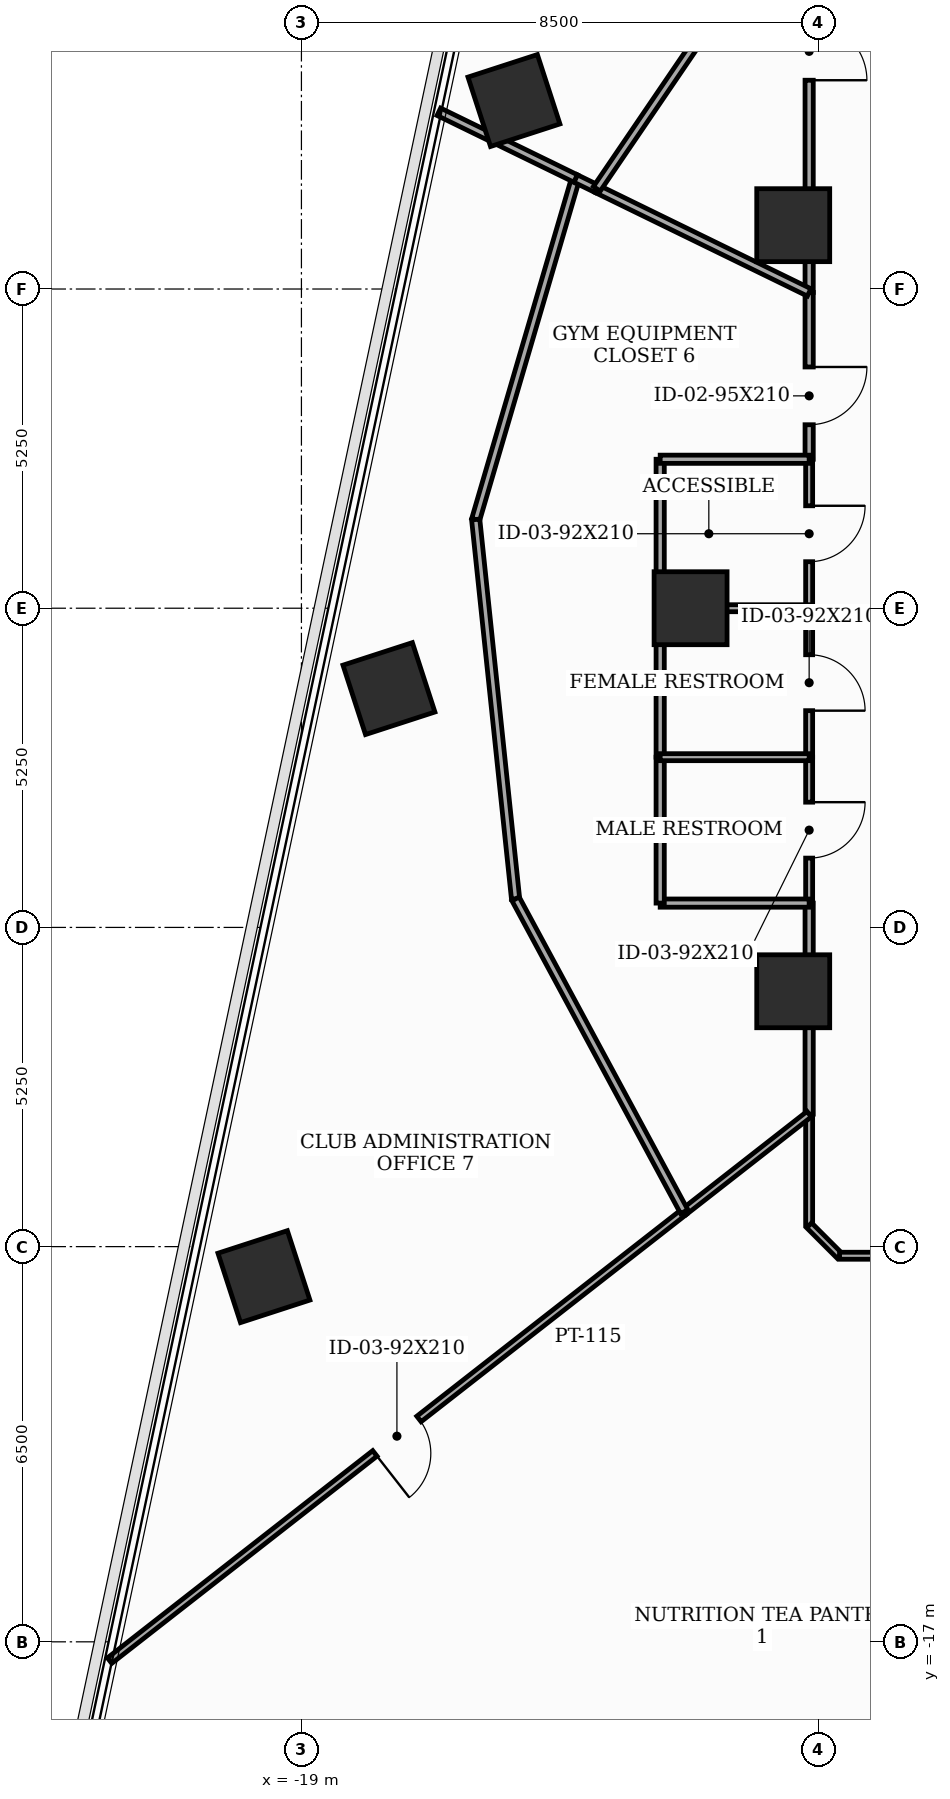
"""IFC4 building model, lengths in metres.
Left out: names, types, materials, properties, quantities, classifications, styles, units other than length and angle.
Written with IfcOpenShell. Run it as: python <this file> out.ifc"""

import sys

from ifc_helpers import new_model, si_unit, direction, frame, frame_2d, origin, origin_2d, place, context, subcontext, project, spatial, rectangle, extrude, element, fill, save


model = new_model("IFC4")
c1 = context("Model", 3, precision=1e-05, world=origin(), true_north=direction((0.0, 1.0)))
c2 = subcontext(c1, "Body", "Model", "MODEL_VIEW")
j1 = project(units=[si_unit("LENGTHUNIT", "METRE"), si_unit("PLANEANGLEUNIT", "RADIAN")], contexts=[c1])
p1 = place(None, origin())
s1 = spatial("IfcSite", under=j1, at=p1, CompositionType="ELEMENT")
p2 = place(p1, origin())
s2 = spatial("IfcBuilding", under=s1, at=p2, CompositionType="ELEMENT")
p3 = place(p2, frame((0.0, 0.0, 105.1)))
s3 = spatial("IfcBuildingStorey", under=s2, at=p3, CompositionType="ELEMENT", Elevation=105.1)
for number, where, z_axis, x_axis in (
    (1, (-10.912, 6.3, 0.0), (0.0, 0.0, 1.0), (1.0, 0.0, 0.0)),
    (2, (-12.6, 0.0, 0.0), (0.0, 0.0, 1.0), (1.0, 0.0, 0.0)),
    (3, (-10.912, -6.3, 0.0), (0.0, 0.0, 1.0), (1.0, 0.0, 0.0)),
    (4, (-15.505, 8.35, 0.0), (0.0, 0.0, 1.0), (0.951, 0.309, 0.0)),
    (5, (-17.561, -1.322, 0.0), (0.0, 0.0, 1.0), (0.951, 0.309, 0.0)),
    (6, (-19.616, -10.994, 0.0), (0.0, 0.0, 1.0), (0.951, 0.309, 0.0)),
):
    element("IfcColumn", number, at=place(p3, frame(where, z_axis=z_axis, x_axis=x_axis)), inside=s3, PredefinedType="COLUMN", context=c2, shape_type="SweptSolid", body=[
        extrude(rectangle(XDim=1.2, YDim=1.2, at=origin_2d()), origin(), (0.0, 0.0, 1.0), 3.7),
    ])
p4 = place(p3, frame((-10.65, -8.321, 0.0), z_axis=(0.0, 0.0, 1.0), x_axis=(0.0, -1.0, 0.0)))
e7 = element("IfcWall", 7, at=p4, inside=s3, PredefinedType="PARTITIONING", context=c2, shape_type="SweptSolid", body=[
    extrude(rectangle(XDim=1.829, YDim=0.115, at=frame_2d((0.915, 0.0))), origin(), (0.0, 0.0, 1.0), 3.5),
])
p5 = place(p3, frame((-10.65, -10.15, 0.0), z_axis=(0.0, 0.0, 1.0), x_axis=(0.707106781187, -0.707106781187, 0.0)))
e8 = element("IfcWall", 8, at=p5, inside=s3, PredefinedType="PARTITIONING", context=c2, shape_type="SweptSolid", body=[
    extrude(rectangle(XDim=0.707, YDim=0.115, at=frame_2d((0.354, 0.0))), origin(), (0.0, 0.0, 1.0), 3.5),
])
p6 = place(p3, frame((-10.15, -10.65, 0.0), z_axis=(0.0, 0.0, 1.0), x_axis=(1.0, 0.0, 0.0)))
e9 = element("IfcWall", 9, at=p6, inside=s3, PredefinedType="PARTITIONING", context=c2, shape_type="SweptSolid", body=[
    extrude(rectangle(XDim=6.158, YDim=0.115, at=frame_2d((3.079, 0.0))), origin(), (0.0, 0.0, 1.0), 2.785),
])
p7 = place(p3, frame((-10.65, -4.85, 0.0), z_axis=(0.0, 0.0, 1.0), x_axis=(0.0, -1.0, 0.0)))
e10 = element("IfcWall", 10, at=p7, inside=s3, PredefinedType="PARTITIONING", context=c2, shape_type="SweptSolid", body=[
    extrude(rectangle(XDim=3.471, YDim=0.135, at=frame_2d((1.735, 0.0))), origin(), (0.0, 0.0, 1.0), 2.785),
])
p8 = place(p3, frame((-10.65, 5.194, 0.0), z_axis=(0.0, 0.0, 1.0), x_axis=(0.0, -1.0, 0.0)))
e11 = element("IfcWall", 11, at=p8, inside=s3, PredefinedType="PARTITIONING", context=c2, shape_type="SweptSolid", body=[
    extrude(rectangle(XDim=2.744, YDim=0.135, at=frame_2d((1.372, 0.0))), origin(), (0.0, 0.0, 1.0), 3.5),
])
p9 = place(p8, frame((1.226, 0.0, 0.0)))
e12 = element("IfcOpeningElement", 12, at=p9, cuts=e11, PredefinedType="OPENING", context=c2, shape_type="SweptSolid", body=[
    extrude(rectangle(XDim=0.95, YDim=2.1, at=frame_2d((0.475, 1.05))), frame((0.0, 0.077, 0.0), z_axis=(0.0, -1.0, 0.0), x_axis=(1.0, 0.0, 0.0)), (0.0, 0.0, 1.0), 0.155),
])
p10 = place(p3, frame((-10.65, 0.0, 0.0), z_axis=(0.0, 0.0, 1.0), x_axis=(0.0, -1.0, 0.0)))
e13 = element("IfcWall", 13, at=p10, inside=s3, PredefinedType="PARTITIONING", context=c2, shape_type="SweptSolid", body=[
    extrude(rectangle(XDim=2.45, YDim=0.115, at=frame_2d((1.225, 0.0))), origin(), (0.0, 0.0, 1.0), 2.785),
])
p11 = place(p10, frame((0.765, 0.0, 0.0)))
e14 = element("IfcOpeningElement", 14, at=p11, cuts=e13, PredefinedType="OPENING", context=c2, shape_type="SweptSolid", body=[
    extrude(rectangle(XDim=0.92, YDim=2.1, at=frame_2d((0.46, 1.05))), frame((0.0, 0.067, 0.0), z_axis=(0.0, -1.0, 0.0), x_axis=(1.0, 0.0, 0.0)), (0.0, 0.0, 1.0), 0.135),
])
p12 = place(p3, frame((-10.65, -2.45, 0.0), z_axis=(0.0, 0.0, 1.0), x_axis=(0.0, -1.0, 0.0)))
e15 = element("IfcWall", 15, at=p12, inside=s3, PredefinedType="PARTITIONING", context=c2, shape_type="SweptSolid", body=[
    extrude(rectangle(XDim=2.4, YDim=0.115, at=frame_2d((1.2, 0.0))), origin(), (0.0, 0.0, 1.0), 3.5),
])
p13 = place(p12, frame((0.74, 0.0, 0.0)))
e16 = element("IfcOpeningElement", 16, at=p13, cuts=e15, PredefinedType="OPENING", context=c2, shape_type="SweptSolid", body=[
    extrude(rectangle(XDim=0.92, YDim=2.1, at=frame_2d((0.46, 1.05))), frame((0.0, 0.067, 0.0), z_axis=(0.0, -1.0, 0.0), x_axis=(1.0, 0.0, 0.0)), (0.0, 0.0, 1.0), 0.135),
])
p14 = place(p3, frame((-10.65, 10.15, 0.0), z_axis=(0.0, 0.0, 1.0), x_axis=(0.0, -1.0, 0.0)))
e17 = element("IfcWall", 17, at=p14, inside=s3, PredefinedType="PARTITIONING", context=c2, shape_type="SweptSolid", body=[
    extrude(rectangle(XDim=4.956, YDim=0.135, at=frame_2d((2.478, 0.0))), origin(), (0.0, 0.0, 1.0), 2.785),
])
p15 = place(p14, frame((0.516, 0.0, 0.0)))
e18 = element("IfcOpeningElement", 18, at=p15, cuts=e17, PredefinedType="OPENING", context=c2, shape_type="SweptSolid", body=[
    extrude(rectangle(XDim=0.95, YDim=2.1, at=frame_2d((0.475, 1.05))), frame((0.0, 0.077, 0.0), z_axis=(0.0, -1.0, 0.0), x_axis=(1.0, 0.0, 0.0)), (0.0, 0.0, 1.0), 0.155),
])
p16 = place(p3, frame((-10.65, 2.45, 0.0), z_axis=(0.0, 0.0, 1.0), x_axis=(0.0, -1.0, 0.0)))
e19 = element("IfcWall", 19, at=p16, inside=s3, PredefinedType="PARTITIONING", context=c2, shape_type="SweptSolid", body=[
    extrude(rectangle(XDim=2.45, YDim=0.115, at=frame_2d((1.225, 0.0))), origin(), (0.0, 0.0, 1.0), 2.785),
])
p17 = place(p16, frame((0.765, 0.0, 0.0)))
e20 = element("IfcOpeningElement", 20, at=p17, cuts=e19, PredefinedType="OPENING", context=c2, shape_type="SweptSolid", body=[
    extrude(rectangle(XDim=0.92, YDim=2.1, at=frame_2d((0.46, 1.05))), frame((0.0, 0.067, 0.0), z_axis=(0.0, -1.0, 0.0), x_axis=(1.0, 0.0, 0.0)), (0.0, 0.0, 1.0), 0.135),
])
p18 = place(p3, frame((-10.65, -8.321, 0.0), z_axis=(0.0, 0.0, 1.0), x_axis=(-0.787998815749, -0.615676754782, 0.0)))
e21 = element("IfcWall", 21, at=p18, inside=s3, PredefinedType="PARTITIONING", context=c2, shape_type="SweptSolid", body=[
    extrude(rectangle(XDim=2.607, YDim=0.115, at=frame_2d((1.303, 0.0))), origin(), (0.0, 0.0, 1.0), 3.5),
])
p19 = place(p3, frame((-12.704, -9.926, 0.0), z_axis=(0.0, 0.0, 1.0), x_axis=(-0.788033940978, -0.615631795692, 0.0)))
e22 = element("IfcWall", 22, at=p19, inside=s3, PredefinedType="PARTITIONING", context=c2, shape_type="SweptSolid", body=[
    extrude(rectangle(XDim=11.993, YDim=0.115, at=frame_2d((5.997, 0.0))), origin(), (0.0, 0.0, 1.0), 2.935),
])
p20 = place(p19, frame((5.537, 0.0, 0.0)))
e23 = element("IfcOpeningElement", 23, at=p20, cuts=e22, PredefinedType="OPENING", context=c2, shape_type="SweptSolid", body=[
    extrude(rectangle(XDim=0.92, YDim=2.1, at=frame_2d((0.46, 1.05))), frame((0.0, 0.067, 0.0), z_axis=(0.0, -1.0, 0.0), x_axis=(1.0, 0.0, 0.0)), (0.0, 0.0, 1.0), 0.135),
])
p21 = place(p3, frame((-13.1, -2.45, 0.0), z_axis=(0.0, 0.0, 1.0), x_axis=(0.0, 1.0, 0.0)))
e24 = element("IfcWall", 24, at=p21, inside=s3, PredefinedType="PARTITIONING", context=c2, shape_type="SweptSolid", body=[
    extrude(rectangle(XDim=2.45, YDim=0.135, at=frame_2d((1.225, 0.0))), origin(), (0.0, 0.0, 1.0), 2.785),
])
p22 = place(p3, frame((-10.65, -4.85, 0.0), z_axis=(0.0, 0.0, 1.0), x_axis=(-1.0, 0.0, 0.0)))
e25 = element("IfcWall", 25, at=p22, inside=s3, PredefinedType="PARTITIONING", context=c2, shape_type="SweptSolid", body=[
    extrude(rectangle(XDim=2.45, YDim=0.135, at=frame_2d((1.225, 0.0))), origin(), (0.0, 0.0, 1.0), 2.785),
])
p23 = place(p3, frame((-13.1, -4.85, 0.0), z_axis=(0.0, 0.0, 1.0), x_axis=(0.0, 1.0, 0.0)))
e26 = element("IfcWall", 26, at=p23, inside=s3, PredefinedType="PARTITIONING", context=c2, shape_type="SweptSolid", body=[
    extrude(rectangle(XDim=2.4, YDim=0.135, at=frame_2d((1.2, 0.0))), origin(), (0.0, 0.0, 1.0), 3.5),
])
p24 = place(p3, frame((-14.491, 7.068, 0.0), z_axis=(0.0, 0.0, 1.0), x_axis=(-0.28111457881, -0.95967421221, 0.0)))
e27 = element("IfcWall", 27, at=p24, inside=s3, PredefinedType="PARTITIONING", context=c2, shape_type="SweptSolid", body=[
    extrude(rectangle(XDim=5.845, YDim=0.135, at=frame_2d((2.922, 0.0))), origin(), (0.0, 0.0, 1.0), 3.5),
])
p25 = place(p3, frame((-16.134, 1.459, 0.0), z_axis=(0.0, 0.0, 1.0), x_axis=(0.104553126753, -0.994519302822, 0.0)))
e28 = element("IfcWall", 28, at=p25, inside=s3, PredefinedType="PARTITIONING", context=c2, shape_type="SweptSolid", body=[
    extrude(rectangle(XDim=6.274, YDim=0.135, at=frame_2d((3.137, 0.0))), origin(), (0.0, 0.0, 1.0), 2.785),
])
p26 = place(p3, frame((-15.478, -4.781, 0.0), z_axis=(0.0, 0.0, 1.0), x_axis=(0.47456801742, -0.880218834633, 0.0)))
e29 = element("IfcWall", 29, at=p26, inside=s3, PredefinedType="PARTITIONING", context=c2, shape_type="SweptSolid", body=[
    extrude(rectangle(XDim=5.845, YDim=0.135, at=frame_2d((2.923, 0.0))), origin(), (0.0, 0.0, 1.0), 2.785),
])
p27 = place(p3, frame((-14.142, 6.898, 0.0), z_axis=(0.0, 0.0, 1.0), x_axis=(-0.898786579289, 0.438386456098, 0.0)))
e30 = element("IfcWall", 30, at=p27, inside=s3, PredefinedType="PARTITIONING", context=c2, shape_type="SweptSolid", body=[
    extrude(rectangle(XDim=0.388, YDim=0.135, at=frame_2d((0.194, 0.0))), origin(), (0.0, 0.0, 1.0), 3.5),
])
p28 = place(p3, frame((-10.65, 5.194, 0.0), z_axis=(0.0, 0.0, 1.0), x_axis=(-0.898732815367, 0.438496666558, 0.0)))
e31 = element("IfcWall", 31, at=p28, inside=s3, PredefinedType="PARTITIONING", context=c2, shape_type="SweptSolid", body=[
    extrude(rectangle(XDim=3.886, YDim=0.135, at=frame_2d((1.943, 0.0))), origin(), (0.0, 0.0, 1.0), 2.785),
])
p29 = place(p3, frame((-13.1, 0.0, 0.0), z_axis=(0.0, 0.0, 1.0), x_axis=(0.0, 1.0, 0.0)))
e32 = element("IfcWall", 32, at=p29, inside=s3, PredefinedType="PARTITIONING", context=c2, shape_type="SweptSolid", body=[
    extrude(rectangle(XDim=2.45, YDim=0.135, at=frame_2d((1.225, 0.0))), origin(), (0.0, 0.0, 1.0), 2.785),
])
p30 = place(p3, frame((-13.1, 2.45, 0.0), z_axis=(0.0, 0.0, 1.0), x_axis=(1.0, 0.0, 0.0)))
e33 = element("IfcWall", 33, at=p30, inside=s3, PredefinedType="PARTITIONING", context=c2, shape_type="SweptSolid", body=[
    extrude(rectangle(XDim=2.45, YDim=0.135, at=frame_2d((1.225, 0.0))), origin(), (0.0, 0.0, 1.0), 2.785),
])
for number, where, z_axis, x_axis in (
    (34, (-13.1, -2.45, 0.0), (0.0, 0.0, 1.0), (1.0, 0.0, 0.0)),
    (35, (-10.65, 0.0, 0.0), (0.0, 0.0, 1.0), (-1.0, 0.0, 0.0)),
):
    element("IfcWall", number, at=place(p3, frame(where, z_axis=z_axis, x_axis=x_axis)), inside=s3, PredefinedType="PARTITIONING", context=c2, shape_type="SweptSolid", body=[
        extrude(rectangle(XDim=2.45, YDim=0.115, at=frame_2d((1.225, 0.0))), origin(), (0.0, 0.0, 1.0), 2.785),
    ])
p31 = place(p3, frame((-14.491, 7.068, 0.0), z_axis=(0.0, 0.0, 1.0), x_axis=(-0.898774071038, 0.438412099777, 0.0)))
e36 = element("IfcWall", 36, at=p31, inside=s3, PredefinedType="PARTITIONING", context=c2, shape_type="SweptSolid", body=[
    extrude(rectangle(XDim=2.503, YDim=0.135, at=frame_2d((1.251, 0.0))), origin(), (0.0, 0.0, 1.0), 2.935),
])
p32 = place(p3, frame((-14.142, 6.898, 0.0), z_axis=(0.0, 0.0, 1.0), x_axis=(0.562725506953, 0.826643819202, 0.0)))
e37 = element("IfcWall", 37, at=p32, inside=s3, PredefinedType="PARTITIONING", context=c2, shape_type="SweptSolid", body=[
    extrude(rectangle(XDim=4.933, YDim=0.135, at=frame_2d((2.467, 0.0))), origin(), (0.0, 0.0, 1.0), 2.785),
])
p33 = place(p9, origin())
e38 = element("IfcDoor", 38, at=p33, inside=s3, OperationType="SINGLE_SWING_LEFT", PredefinedType="DOOR", context=c2, shape_type="SweptSolid", body=[
    extrude(rectangle(XDim=0.95, YDim=2.1, at=frame_2d((0.475, 1.05))), frame((0.0, 0.025, 0.0), z_axis=(0.0, -1.0, 0.0), x_axis=(1.0, 0.0, 0.0)), (0.0, 0.0, 1.0), 0.05),
])
fill(e12, e38)
p34 = place(p11, origin())
e39 = element("IfcDoor", 39, at=p34, inside=s3, OperationType="SINGLE_SWING_RIGHT", PredefinedType="DOOR", context=c2, shape_type="SweptSolid", body=[
    extrude(rectangle(XDim=0.92, YDim=2.1, at=frame_2d((0.46, 1.05))), frame((0.0, 0.025, 0.0), z_axis=(0.0, -1.0, 0.0), x_axis=(1.0, 0.0, 0.0)), (0.0, 0.0, 1.0), 0.05),
])
fill(e14, e39)
p35 = place(p13, origin())
e40 = element("IfcDoor", 40, at=p35, inside=s3, OperationType="SINGLE_SWING_LEFT", PredefinedType="DOOR", context=c2, shape_type="SweptSolid", body=[
    extrude(rectangle(XDim=0.92, YDim=2.1, at=frame_2d((0.46, 1.05))), frame((0.0, 0.025, 0.0), z_axis=(0.0, -1.0, 0.0), x_axis=(1.0, 0.0, 0.0)), (0.0, 0.0, 1.0), 0.05),
])
fill(e16, e40)
p36 = place(p15, origin())
e41 = element("IfcDoor", 41, at=p36, inside=s3, OperationType="SINGLE_SWING_RIGHT", PredefinedType="DOOR", context=c2, shape_type="SweptSolid", body=[
    extrude(rectangle(XDim=0.95, YDim=2.1, at=frame_2d((0.475, 1.05))), frame((0.0, 0.025, 0.0), z_axis=(0.0, -1.0, 0.0), x_axis=(1.0, 0.0, 0.0)), (0.0, 0.0, 1.0), 0.05),
])
fill(e18, e41)
p37 = place(p17, origin())
e42 = element("IfcDoor", 42, at=p37, inside=s3, OperationType="SINGLE_SWING_LEFT", PredefinedType="DOOR", context=c2, shape_type="SweptSolid", body=[
    extrude(rectangle(XDim=0.92, YDim=2.1, at=frame_2d((0.46, 1.05))), frame((0.0, 0.025, 0.0), z_axis=(0.0, -1.0, 0.0), x_axis=(1.0, 0.0, 0.0)), (0.0, 0.0, 1.0), 0.05),
])
fill(e20, e42)
p38 = place(p20, origin())
e43 = element("IfcDoor", 43, at=p38, inside=s3, OperationType="SINGLE_SWING_RIGHT", PredefinedType="DOOR", context=c2, shape_type="SweptSolid", body=[
    extrude(rectangle(XDim=0.92, YDim=2.1, at=frame_2d((0.46, 1.05))), frame((0.0, 0.025, 0.0), z_axis=(0.0, -1.0, 0.0), x_axis=(1.0, 0.0, 0.0)), (0.0, 0.0, 1.0), 0.05),
])
fill(e23, e43)
save(model, sys.argv[1])
